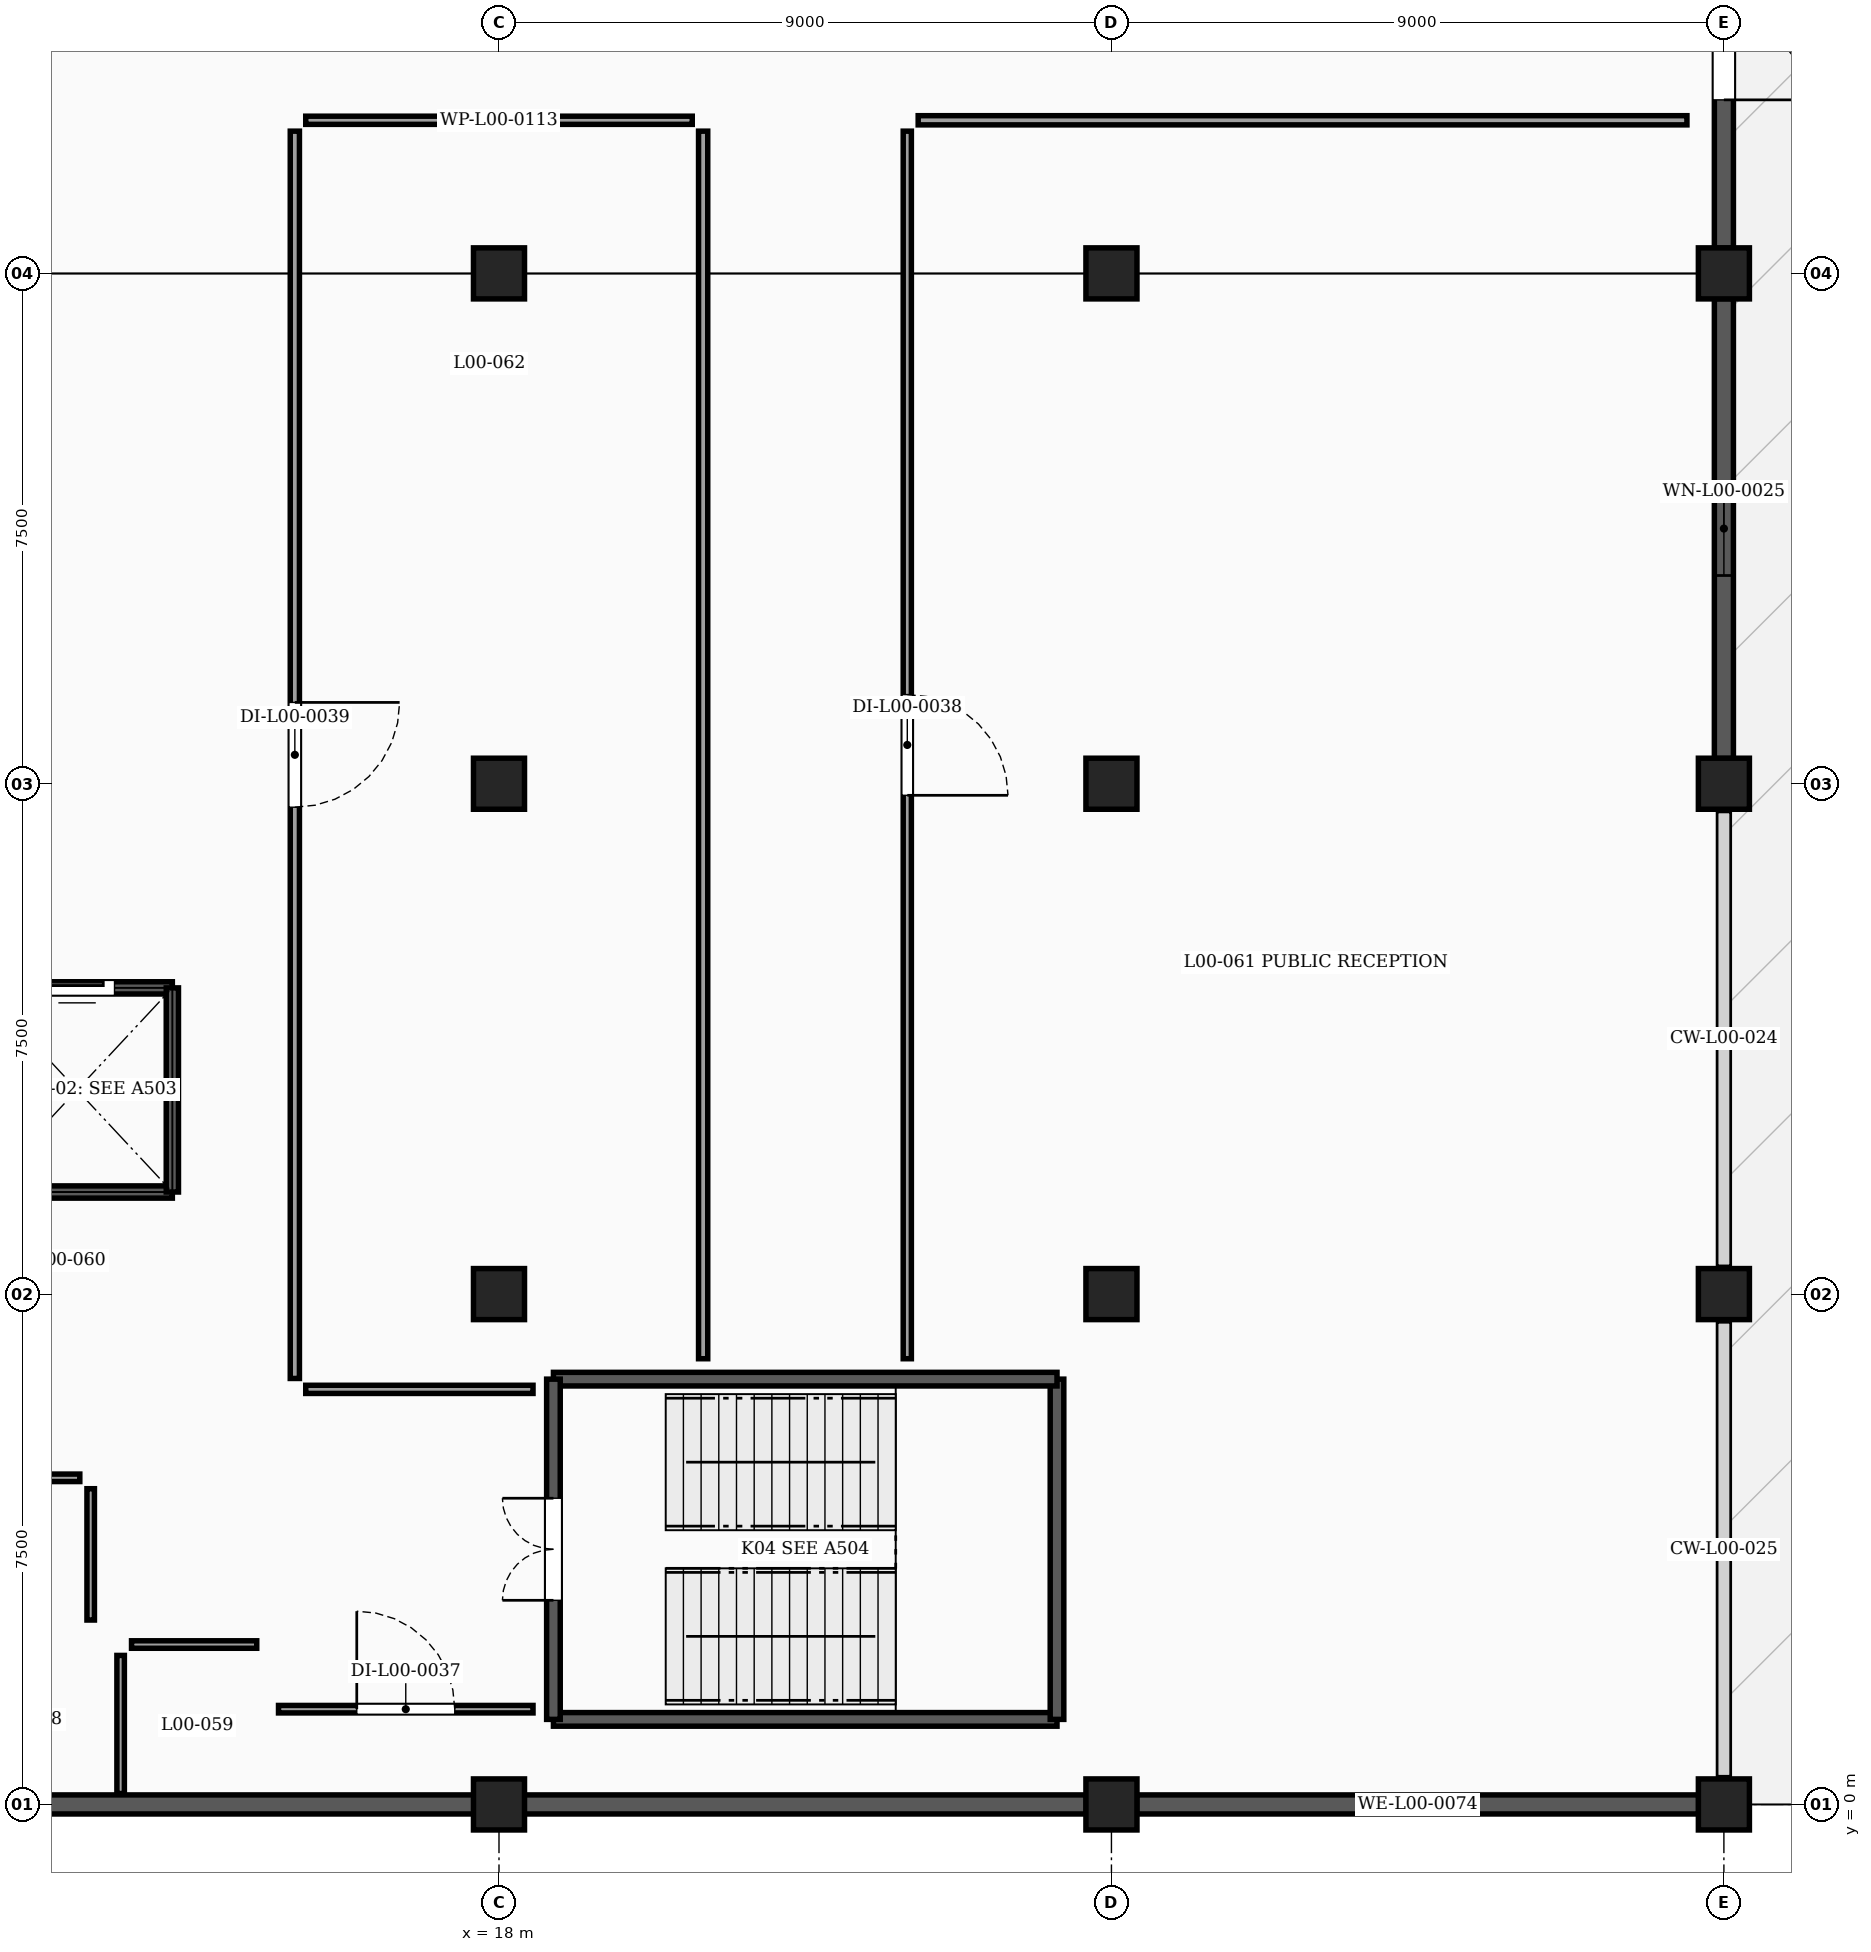
"""IFC4 building model, lengths in metres.
Left out: names, types, materials, properties, quantities, classifications, styles, units other than length and angle.
Written with IfcOpenShell. Run it as: python <this file> out.ifc"""

import sys

from ifc_helpers import new_model, si_unit, direction, frame, frame_2d, origin, origin_2d, place, context, subcontext, project, spatial, rectangle, extrude, element, fill, save


model = new_model("IFC4")
c1 = context("Model", 3, precision=1e-05, world=origin(), true_north=direction((0.0, 1.0)))
c2 = subcontext(c1, "Body", "Model", "MODEL_VIEW")
j1 = project(units=[si_unit("LENGTHUNIT", "METRE"), si_unit("PLANEANGLEUNIT", "RADIAN")], contexts=[c1])
p1 = place(None, origin())
s1 = spatial("IfcSite", under=j1, at=p1, CompositionType="ELEMENT")
p2 = place(p1, origin())
s2 = spatial("IfcBuilding", under=s1, at=p2, CompositionType="ELEMENT")
p3 = place(p2, origin())
s3 = spatial("IfcBuildingStorey", under=s2, at=p3, CompositionType="ELEMENT", Elevation=0.0)
for number, where, z_axis, x_axis in (
    (1, (18.0, 0.0, -0.25), (0.0, 0.0, 1.0), (1.0, 0.0, 0.0)),
    (2, (27.0, 0.0, -0.25), (0.0, 0.0, 1.0), (1.0, 0.0, 0.0)),
    (3, (36.0, 0.0, -0.25), (0.0, 0.0, 1.0), (1.0, 0.0, 0.0)),
    (4, (18.0, 7.5, -0.25), (0.0, 0.0, 1.0), (1.0, 0.0, 0.0)),
    (5, (27.0, 7.5, -0.25), (0.0, 0.0, 1.0), (1.0, 0.0, 0.0)),
    (6, (36.0, 7.5, -0.25), (0.0, 0.0, 1.0), (1.0, 0.0, 0.0)),
    (7, (18.0, 15.0, -0.25), (0.0, 0.0, 1.0), (1.0, 0.0, 0.0)),
    (8, (27.0, 15.0, -0.25), (0.0, 0.0, 1.0), (1.0, 0.0, 0.0)),
    (9, (36.0, 15.0, -0.25), (0.0, 0.0, 1.0), (1.0, 0.0, 0.0)),
    (10, (18.0, 22.5, -0.25), (0.0, 0.0, 1.0), (1.0, 0.0, 0.0)),
    (11, (27.0, 22.5, -0.25), (0.0, 0.0, 1.0), (1.0, 0.0, 0.0)),
    (12, (36.0, 22.5, -0.25), (0.0, 0.0, 1.0), (1.0, 0.0, 0.0)),
):
    element("IfcColumn", number, at=place(p3, frame(where, z_axis=z_axis, x_axis=x_axis)), inside=s3, PredefinedType="COLUMN", context=c2, shape_type="SweptSolid", body=[
        extrude(rectangle(XDim=0.75, YDim=0.75, at=origin_2d()), origin(), (0.0, 0.0, 1.0), 4.75),
    ])
p4 = place(p3, frame((36.0, 29.629, 0.0), z_axis=(0.0, 0.0, 1.0), x_axis=(0.0, -1.0, 0.0)))
e13 = element("IfcWall", 13, at=p4, inside=s3, PredefinedType="SOLIDWALL", context=c2, shape_type="SweptSolid", body=[
    extrude(rectangle(XDim=6.758, YDim=0.28, at=frame_2d((3.379, 0.0))), origin(), (0.0, 0.0, 1.0), 3.332),
])
p5 = place(p4, frame((2.179, 0.0, 0.0)))
e14 = element("IfcOpeningElement", 14, at=p5, cuts=e13, PredefinedType="OPENING", context=c2, shape_type="SweptSolid", body=[
    extrude(rectangle(XDim=2.4, YDim=2.25, at=frame_2d((1.2, 1.125))), frame((0.0, 0.15, 0.0), z_axis=(0.0, -1.0, 0.0), x_axis=(1.0, 0.0, 0.0)), (0.0, 0.0, 1.0), 0.3),
])
p6 = place(p3, frame((36.0, 22.129, 0.0), z_axis=(0.0, 0.0, 1.0), x_axis=(0.0, -1.0, 0.0)))
e15 = element("IfcWall", 15, at=p6, inside=s3, PredefinedType="SOLIDWALL", context=c2, shape_type="SweptSolid", body=[
    extrude(rectangle(XDim=6.758, YDim=0.28, at=frame_2d((3.379, 0.0))), origin(), (0.0, 0.0, 1.0), 3.332),
])
p7 = place(p6, frame((2.689, 0.0, 0.95)))
e16 = element("IfcOpeningElement", 16, at=p7, cuts=e15, PredefinedType="OPENING", context=c2, shape_type="SweptSolid", body=[
    extrude(rectangle(XDim=1.38, YDim=1.48, at=frame_2d((0.69, 0.74))), frame((0.0, 0.15, 0.0), z_axis=(0.0, -1.0, 0.0), x_axis=(1.0, 0.0, 0.0)), (0.0, 0.0, 1.0), 0.3),
])
for number, where, z_axis, x_axis in (
    (17, (35.629, 0.0, 0.0), (0.0, 0.0, 1.0), (-1.0, 0.0, 0.0)),
    (18, (26.629, 0.0, 0.0), (0.0, 0.0, 1.0), (-1.0, 0.0, 0.0)),
    (19, (17.629, 0.0, 0.0), (0.0, 0.0, 1.0), (-1.0, 0.0, 0.0)),
):
    element("IfcWall", number, at=place(p3, frame(where, z_axis=z_axis, x_axis=x_axis)), inside=s3, PredefinedType="SOLIDWALL", context=c2, shape_type="SweptSolid", body=[
        extrude(rectangle(XDim=8.258, YDim=0.28, at=frame_2d((4.129, 0.0))), origin(), (0.0, 0.0, 1.0), 3.332),
    ])
p8 = place(p3, frame((18.8, 1.25, 0.0), z_axis=(0.0, 0.0, 1.0), x_axis=(1.0, 0.0, 0.0)))
e20 = element("IfcWall", 20, at=p8, inside=s3, PredefinedType="SHEAR", context=c2, shape_type="SweptSolid", body=[
    extrude(rectangle(XDim=7.4, YDim=0.2, at=frame_2d((3.7, 0.0))), origin(), (0.0, 0.0, 1.0), 4.09),
])
p9 = place(p3, frame((26.2, 1.25, 0.0), z_axis=(0.0, 0.0, 1.0), x_axis=(0.0, 1.0, 0.0)))
e21 = element("IfcWall", 21, at=p9, inside=s3, PredefinedType="SHEAR", context=c2, shape_type="SweptSolid", body=[
    extrude(rectangle(XDim=5.0, YDim=0.2, at=frame_2d((2.5, 0.0))), origin(), (0.0, 0.0, 1.0), 4.09),
])
p10 = place(p3, frame((26.2, 6.25, 0.0), z_axis=(0.0, 0.0, 1.0), x_axis=(-1.0, 0.0, 0.0)))
e22 = element("IfcWall", 22, at=p10, inside=s3, PredefinedType="SHEAR", context=c2, shape_type="SweptSolid", body=[
    extrude(rectangle(XDim=7.4, YDim=0.2, at=frame_2d((3.7, 0.0))), origin(), (0.0, 0.0, 1.0), 4.09),
])
p11 = place(p3, frame((18.8, 1.25, 0.0), z_axis=(0.0, 0.0, 1.0), x_axis=(0.0, 1.0, 0.0)))
e23 = element("IfcWall", 23, at=p11, inside=s3, PredefinedType="SHEAR", context=c2, shape_type="SweptSolid", body=[
    extrude(rectangle(XDim=5.0, YDim=0.2, at=frame_2d((2.5, 0.0))), origin(), (0.0, 0.0, 1.0), 4.09),
])
p12 = place(p11, frame((1.75, 0.0, 0.0)))
e24 = element("IfcOpeningElement", 24, at=p12, cuts=e23, PredefinedType="OPENING", context=c2, shape_type="SweptSolid", body=[
    extrude(rectangle(XDim=1.5, YDim=2.15, at=frame_2d((0.75, 1.075))), frame((0.0, 0.11, 0.0), z_axis=(0.0, -1.0, 0.0), x_axis=(1.0, 0.0, 0.0)), (0.0, 0.0, 1.0), 0.22),
])
p13 = place(p3, frame((13.2, 9.0, -0.2), z_axis=(0.0, 0.0, 1.0), x_axis=(-1.0, 0.0, 0.0)))
e25 = element("IfcWall", 25, at=p13, inside=s3, PredefinedType="SHEAR", context=c2, shape_type="SweptSolid", body=[
    extrude(rectangle(XDim=2.8, YDim=0.18, at=frame_2d((1.4, 0.0))), origin(), (0.0, 0.0, 1.0), 4.29),
])
p14 = place(p3, frame((10.4, 12.0, -0.2), z_axis=(0.0, 0.0, 1.0), x_axis=(1.0, 0.0, 0.0)))
e26 = element("IfcWall", 26, at=p14, inside=s3, PredefinedType="SHEAR", context=c2, shape_type="SweptSolid", body=[
    extrude(rectangle(XDim=2.8, YDim=0.18, at=frame_2d((1.4, 0.0))), origin(), (0.0, 0.0, 1.0), 4.29),
])
p15 = place(p14, frame((0.85, 0.0, 0.2)))
e27 = element("IfcOpeningElement", 27, at=p15, cuts=e26, PredefinedType="OPENING", context=c2, shape_type="SweptSolid", body=[
    extrude(rectangle(XDim=1.1, YDim=2.15, at=frame_2d((0.55, 1.075))), frame((0.0, 0.1, 0.0), z_axis=(0.0, -1.0, 0.0), x_axis=(1.0, 0.0, 0.0)), (0.0, 0.0, 1.0), 0.2),
])
p16 = place(p3, frame((13.2, 12.0, -0.2), z_axis=(0.0, 0.0, 1.0), x_axis=(0.0, -1.0, 0.0)))
e28 = element("IfcWall", 28, at=p16, inside=s3, PredefinedType="SHEAR", context=c2, shape_type="SweptSolid", body=[
    extrude(rectangle(XDim=3.0, YDim=0.18, at=frame_2d((1.5, 0.0))), origin(), (0.0, 0.0, 1.0), 4.29),
])
p17 = place(p3, frame((12.44, 0.16, 0.0), z_axis=(0.0, 0.0, 1.0), x_axis=(0.0, 1.0, 0.0)))
e29 = element("IfcWall", 29, at=p17, inside=s3, PredefinedType="PARTITIONING", context=c2, shape_type="SweptSolid", body=[
    extrude(rectangle(XDim=2.03, YDim=0.11, at=frame_2d((1.015, 0.0))), origin(), (0.0, 0.0, 1.0), 4.09),
])
p18 = place(p3, frame((11.84, 4.8, 0.0), z_axis=(0.0, 0.0, 1.0), x_axis=(-1.0, 0.0, 0.0)))
e30 = element("IfcWall", 30, at=p18, inside=s3, PredefinedType="PARTITIONING", context=c2, shape_type="SweptSolid", body=[
    extrude(rectangle(XDim=1.38, YDim=0.11, at=frame_2d((0.69, 0.0))), origin(), (0.0, 0.0, 1.0), 4.09),
])
p19 = place(p3, frame((12.0, 2.71, 0.0), z_axis=(0.0, 0.0, 1.0), x_axis=(0.0, 1.0, 0.0)))
e31 = element("IfcWall", 31, at=p19, inside=s3, PredefinedType="PARTITIONING", context=c2, shape_type="SweptSolid", body=[
    extrude(rectangle(XDim=1.93, YDim=0.11, at=frame_2d((0.965, 0.0))), origin(), (0.0, 0.0, 1.0), 3.775),
])
p20 = place(p3, frame((14.44, 2.35, 0.0), z_axis=(0.0, 0.0, 1.0), x_axis=(-1.0, 0.0, 0.0)))
e32 = element("IfcWall", 32, at=p20, inside=s3, PredefinedType="PARTITIONING", context=c2, shape_type="SweptSolid", body=[
    extrude(rectangle(XDim=1.84, YDim=0.11, at=frame_2d((0.92, 0.0))), origin(), (0.0, 0.0, 1.0), 4.09),
])
p21 = place(p3, frame((14.76, 1.4, 0.0), z_axis=(0.0, 0.0, 1.0), x_axis=(1.0, 0.0, 0.0)))
e33 = element("IfcWall", 33, at=p21, inside=s3, PredefinedType="PARTITIONING", context=c2, shape_type="SweptSolid", body=[
    extrude(rectangle(XDim=3.74, YDim=0.11, at=frame_2d((1.87, 0.0))), origin(), (0.0, 0.0, 1.0), 4.09),
])
p22 = place(p21, frame((1.15, 0.0, 0.0)))
e34 = element("IfcOpeningElement", 34, at=p22, cuts=e33, PredefinedType="OPENING", context=c2, shape_type="SweptSolid", body=[
    extrude(rectangle(XDim=1.44, YDim=2.18, at=frame_2d((0.72, 1.09))), frame((0.0, 0.065, 0.0), z_axis=(0.0, -1.0, 0.0), x_axis=(1.0, 0.0, 0.0)), (0.0, 0.0, 1.0), 0.13),
])
p23 = place(p3, frame((35.457, 24.75, 0.0), z_axis=(0.0, 0.0, 1.0), x_axis=(-1.0, 0.0, 0.0)))
e35 = element("IfcWall", 35, at=p23, inside=s3, PredefinedType="PARTITIONING", context=c2, shape_type="SweptSolid", body=[
    extrude(rectangle(XDim=11.297, YDim=0.135, at=frame_2d((5.648, 0.0))), origin(), (0.0, 0.0, 1.0), 4.09),
])
p24 = place(p3, frame((24.0, 24.59, 0.0), z_axis=(0.0, 0.0, 1.0), x_axis=(0.0, -1.0, 0.0)))
e36 = element("IfcWall", 36, at=p24, inside=s3, PredefinedType="PARTITIONING", context=c2, shape_type="SweptSolid", body=[
    extrude(rectangle(XDim=18.04, YDim=0.12, at=frame_2d((9.02, 0.0))), origin(), (0.0, 0.0, 1.0), 3.775),
])
p25 = place(p24, frame((8.28, 0.0, 0.0)))
e37 = element("IfcOpeningElement", 37, at=p25, cuts=e36, PredefinedType="OPENING", context=c2, shape_type="SweptSolid", body=[
    extrude(rectangle(XDim=1.48, YDim=2.2, at=frame_2d((0.74, 1.1))), frame((0.0, 0.07, 0.0), z_axis=(0.0, -1.0, 0.0), x_axis=(1.0, 0.0, 0.0)), (0.0, 0.0, 1.0), 0.14),
])
p26 = place(p3, frame((21.0, 6.55, 0.0), z_axis=(0.0, 0.0, 1.0), x_axis=(0.0, 1.0, 0.0)))
e38 = element("IfcWall", 38, at=p26, inside=s3, PredefinedType="PARTITIONING", context=c2, shape_type="SweptSolid", body=[
    extrude(rectangle(XDim=18.04, YDim=0.135, at=frame_2d((9.02, 0.0))), origin(), (0.0, 0.0, 1.0), 3.775),
])
p27 = place(p3, frame((20.84, 24.75, 0.0), z_axis=(0.0, 0.0, 1.0), x_axis=(-1.0, 0.0, 0.0)))
e39 = element("IfcWall", 39, at=p27, inside=s3, PredefinedType="PARTITIONING", context=c2, shape_type="SweptSolid", body=[
    extrude(rectangle(XDim=5.68, YDim=0.12, at=frame_2d((2.84, 0.0))), origin(), (0.0, 0.0, 1.0), 4.09),
])
p28 = place(p3, frame((15.0, 24.59, 0.0), z_axis=(0.0, 0.0, 1.0), x_axis=(0.0, -1.0, 0.0)))
e40 = element("IfcWall", 40, at=p28, inside=s3, PredefinedType="PARTITIONING", context=c2, shape_type="SweptSolid", body=[
    extrude(rectangle(XDim=18.33, YDim=0.135, at=frame_2d((9.165, 0.0))), origin(), (0.0, 0.0, 1.0), 3.775),
])
p29 = place(p28, frame((8.395, 0.0, 0.0)))
e41 = element("IfcOpeningElement", 41, at=p29, cuts=e40, PredefinedType="OPENING", context=c2, shape_type="SweptSolid", body=[
    extrude(rectangle(XDim=1.54, YDim=2.2, at=frame_2d((0.77, 1.1))), frame((0.0, 0.077, 0.0), z_axis=(0.0, -1.0, 0.0), x_axis=(1.0, 0.0, 0.0)), (0.0, 0.0, 1.0), 0.155),
])
p30 = place(p3, frame((15.16, 6.1, 0.0), z_axis=(0.0, 0.0, 1.0), x_axis=(1.0, 0.0, 0.0)))
e42 = element("IfcWall", 42, at=p30, inside=s3, PredefinedType="PARTITIONING", context=c2, shape_type="SweptSolid", body=[
    extrude(rectangle(XDim=3.34, YDim=0.12, at=frame_2d((1.67, 0.0))), origin(), (0.0, 0.0, 1.0), 4.09),
])
p31 = place(p5, origin())
e43 = element("IfcDoor", 43, at=p31, inside=s3, OperationType="DOUBLE_DOOR_SINGLE_SWING", PredefinedType="DOOR", context=c2, shape_type="SweptSolid", body=[
    extrude(rectangle(XDim=2.4, YDim=2.25, at=frame_2d((1.2, 1.125))), frame((0.0, 0.025, 0.0), z_axis=(0.0, -1.0, 0.0), x_axis=(1.0, 0.0, 0.0)), (0.0, 0.0, 1.0), 0.05),
])
fill(e14, e43)
p32 = place(p7, origin())
e44 = element("IfcWindow", 44, at=p32, inside=s3, PartitioningType="DOUBLE_PANEL_VERTICAL", PredefinedType="WINDOW", context=c2, shape_type="SweptSolid", body=[
    extrude(rectangle(XDim=1.38, YDim=1.48, at=frame_2d((0.69, 0.74))), frame((0.0, 0.03, 0.0), z_axis=(0.0, -1.0, 0.0), x_axis=(1.0, 0.0, 0.0)), (0.0, 0.0, 1.0), 0.06),
])
fill(e16, e44)
p33 = place(p12, origin())
e45 = element("IfcDoor", 45, at=p33, inside=s3, OperationType="DOUBLE_DOOR_SINGLE_SWING", PredefinedType="DOOR", context=c2, shape_type="SweptSolid", body=[
    extrude(rectangle(XDim=1.5, YDim=2.15, at=frame_2d((0.75, 1.075))), frame((0.0, 0.025, 0.0), z_axis=(0.0, -1.0, 0.0), x_axis=(1.0, 0.0, 0.0)), (0.0, 0.0, 1.0), 0.05),
])
fill(e24, e45)
p34 = place(p15, origin())
e46 = element("IfcDoor", 46, at=p34, inside=s3, OperationType="SLIDING_TO_LEFT", PredefinedType="DOOR", context=c2, shape_type="SweptSolid", body=[
    extrude(rectangle(XDim=1.1, YDim=2.15, at=frame_2d((0.55, 1.075))), frame((0.0, 0.025, 0.0), z_axis=(0.0, -1.0, 0.0), x_axis=(1.0, 0.0, 0.0)), (0.0, 0.0, 1.0), 0.05),
])
fill(e27, e46)
p35 = place(p22, origin())
e47 = element("IfcDoor", 47, at=p35, inside=s3, OperationType="SINGLE_SWING_LEFT", PredefinedType="DOOR", context=c2, shape_type="SweptSolid", body=[
    extrude(rectangle(XDim=1.44, YDim=2.18, at=frame_2d((0.72, 1.09))), frame((0.0, 0.025, 0.0), z_axis=(0.0, -1.0, 0.0), x_axis=(1.0, 0.0, 0.0)), (0.0, 0.0, 1.0), 0.05),
])
fill(e34, e47)
p36 = place(p25, origin())
e48 = element("IfcDoor", 48, at=p36, inside=s3, OperationType="SINGLE_SWING_RIGHT", PredefinedType="DOOR", context=c2, shape_type="SweptSolid", body=[
    extrude(rectangle(XDim=1.48, YDim=2.2, at=frame_2d((0.74, 1.1))), frame((0.0, 0.025, 0.0), z_axis=(0.0, -1.0, 0.0), x_axis=(1.0, 0.0, 0.0)), (0.0, 0.0, 1.0), 0.05),
])
fill(e37, e48)
p37 = place(p29, origin())
e49 = element("IfcDoor", 49, at=p37, inside=s3, OperationType="SINGLE_SWING_LEFT", PredefinedType="DOOR", context=c2, shape_type="SweptSolid", body=[
    extrude(rectangle(XDim=1.54, YDim=2.2, at=frame_2d((0.77, 1.1))), frame((0.0, 0.025, 0.0), z_axis=(0.0, -1.0, 0.0), x_axis=(1.0, 0.0, 0.0)), (0.0, 0.0, 1.0), 0.05),
])
fill(e41, e49)
save(model, sys.argv[1])
